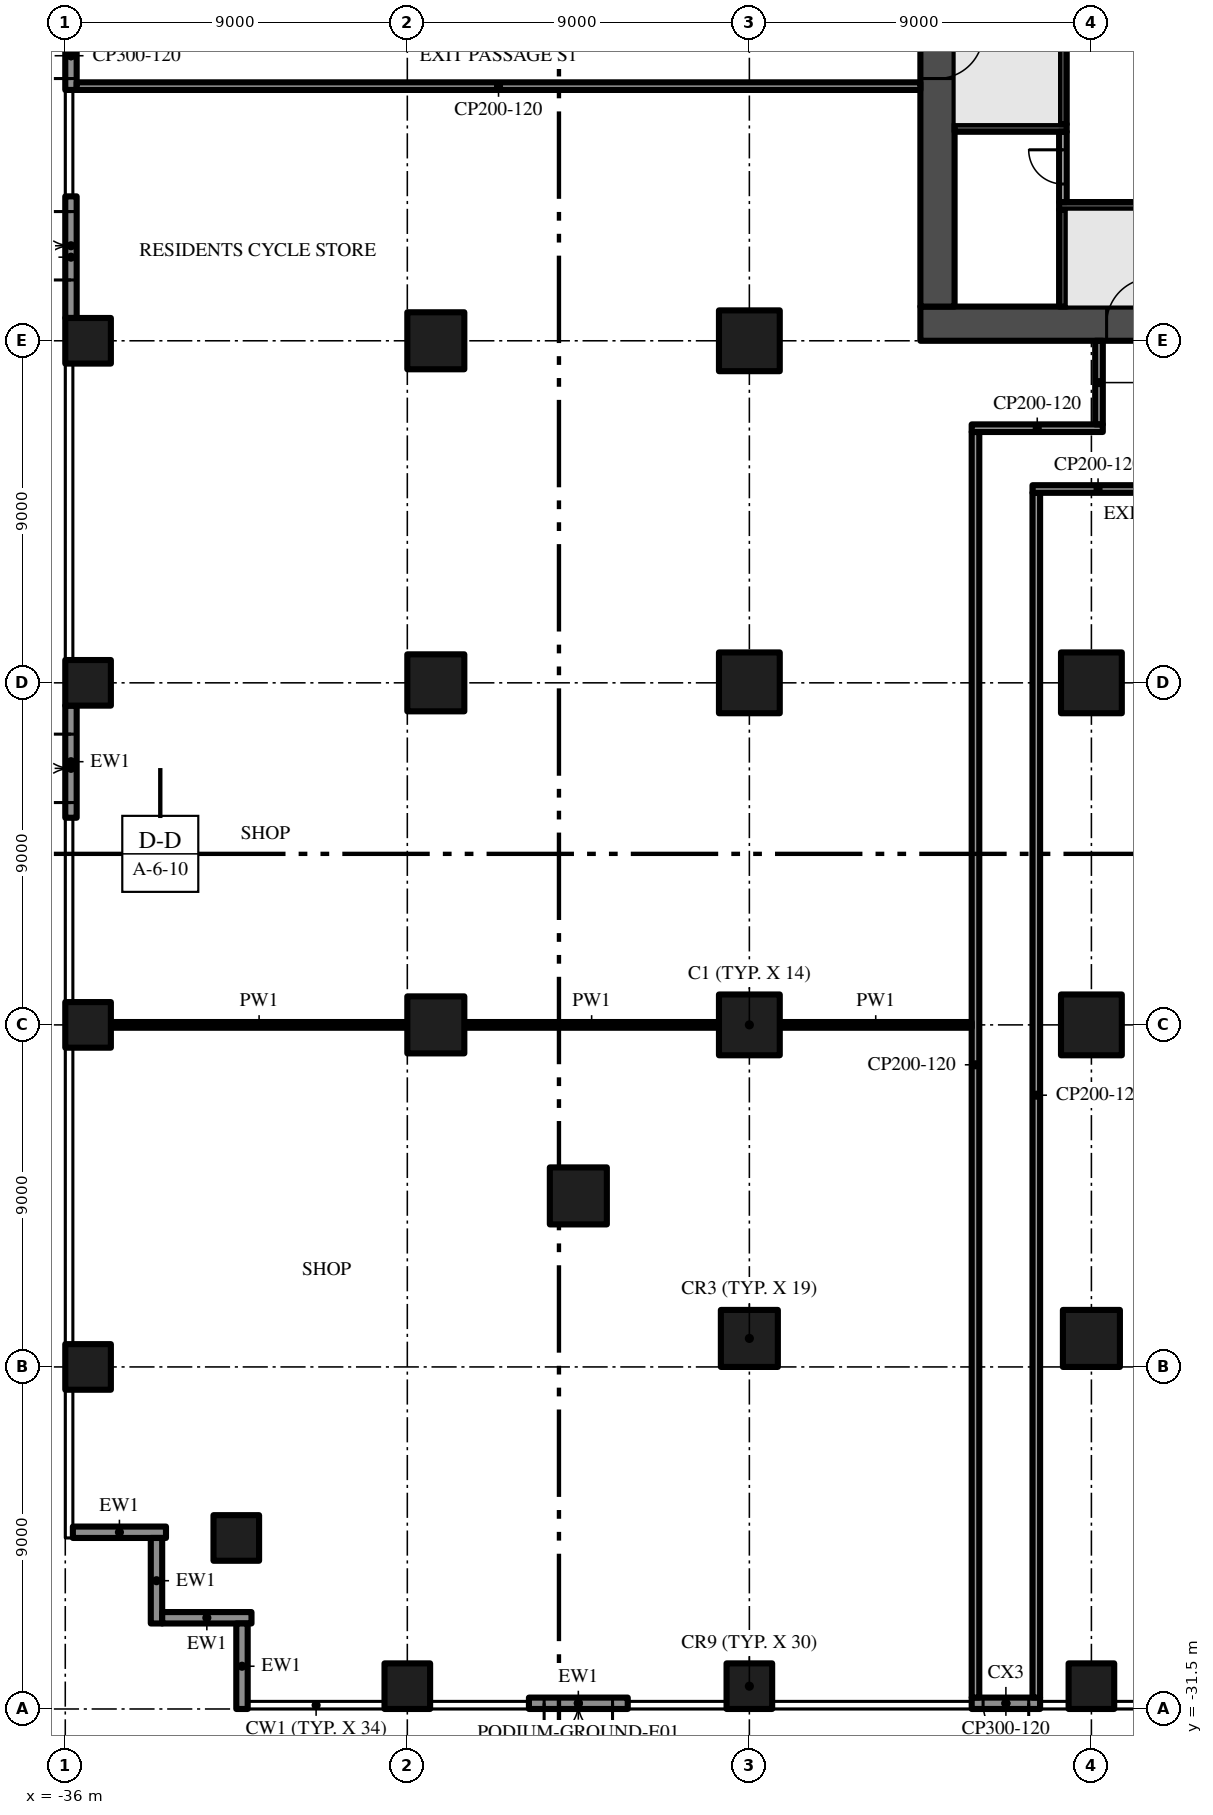
"""IFC4 building model, lengths in metres.
Left out: names, types, materials, properties, quantities, classifications, styles, units other than length and angle.
Written with IfcOpenShell. Run it as: python <this file> out.ifc"""

import sys

from ifc_helpers import new_model, si_unit, direction, frame, frame_2d, origin, origin_2d, place, context, subcontext, project, spatial, rectangle, extrude, element, fill, save


model = new_model("IFC4")
c1 = context("Model", 3, precision=1e-05, world=origin(), true_north=direction((0.0, 1.0)))
c2 = subcontext(c1, "Body", "Model", "MODEL_VIEW")
j1 = project(units=[si_unit("LENGTHUNIT", "METRE"), si_unit("PLANEANGLEUNIT", "RADIAN")], contexts=[c1])
p1 = place(None, origin())
s1 = spatial("IfcSite", under=j1, at=p1, CompositionType="ELEMENT")
p2 = place(p1, origin())
s2 = spatial("IfcBuilding", under=s1, at=p2, CompositionType="ELEMENT")
p3 = place(p2, origin())
s3 = spatial("IfcBuildingStorey", under=s2, at=p3, CompositionType="ELEMENT", Elevation=0.0)
p4 = place(p3, frame((-13.5, 4.95, -2.2), z_axis=(0.0, 0.0, 1.0), x_axis=(1.0, 0.0, 0.0)))
e1 = element("IfcWall", 1, at=p4, inside=s3, PredefinedType="SHEAR", context=c2, shape_type="SweptSolid", body=[
    extrude(rectangle(XDim=27.0, YDim=0.9, at=frame_2d((13.5, 0.0))), origin(), (0.0, 0.0, 1.0), 7.8),
])
p5 = place(p4, frame((12.0, 0.0, 2.2)))
e2 = element("IfcOpeningElement", 2, at=p5, cuts=e1, PredefinedType="OPENING", context=c2, shape_type="SweptSolid", body=[
    extrude(rectangle(XDim=3.0, YDim=2.4, at=frame_2d((1.5, 1.2))), frame((0.0, 0.46, 0.0), z_axis=(0.0, -1.0, 0.0), x_axis=(1.0, 0.0, 0.0)), (0.0, 0.0, 1.0), 0.92),
])
p6 = place(p4, frame((4.9, 0.0, 2.2)))
e3 = element("IfcOpeningElement", 3, at=p6, cuts=e1, PredefinedType="OPENING", context=c2, shape_type="SweptSolid", body=[
    extrude(rectangle(XDim=1.2, YDim=2.2, at=frame_2d((0.6, 1.1))), frame((0.0, 0.46, 0.0), z_axis=(0.0, -1.0, 0.0), x_axis=(1.0, 0.0, 0.0)), (0.0, 0.0, 1.0), 0.92),
])
p7 = place(p4, frame((20.75, 0.0, 2.2)))
e4 = element("IfcOpeningElement", 4, at=p7, cuts=e1, PredefinedType="OPENING", context=c2, shape_type="SweptSolid", body=[
    extrude(rectangle(XDim=1.5, YDim=2.2, at=frame_2d((0.75, 1.1))), frame((0.0, 0.46, 0.0), z_axis=(0.0, -1.0, 0.0), x_axis=(1.0, 0.0, 0.0)), (0.0, 0.0, 1.0), 0.92),
])
p8 = place(p4, frame((17.4, 0.0, 2.2)))
e5 = element("IfcOpeningElement", 5, at=p8, cuts=e1, PredefinedType="OPENING", context=c2, shape_type="SweptSolid", body=[
    extrude(rectangle(XDim=1.2, YDim=2.2, at=frame_2d((0.6, 1.1))), frame((0.0, 0.46, 0.0), z_axis=(0.0, -1.0, 0.0), x_axis=(1.0, 0.0, 0.0)), (0.0, 0.0, 1.0), 0.92),
])
p9 = place(p3, frame((-13.05, 21.6, -2.2), z_axis=(0.0, 0.0, 1.0), x_axis=(0.0, -1.0, 0.0)))
e6 = element("IfcWall", 6, at=p9, inside=s3, PredefinedType="SHEAR", context=c2, shape_type="SweptSolid", body=[
    extrude(rectangle(XDim=16.2, YDim=0.9, at=frame_2d((8.1, 0.0))), origin(), (0.0, 0.0, 1.0), 7.8),
])
p10 = place(p9, frame((9.0, 0.0, 2.2)))
e7 = element("IfcOpeningElement", 7, at=p10, cuts=e6, PredefinedType="OPENING", context=c2, shape_type="SweptSolid", body=[
    extrude(rectangle(XDim=1.2, YDim=2.2, at=frame_2d((0.6, 1.1))), frame((0.0, 0.46, 0.0), z_axis=(0.0, -1.0, 0.0), x_axis=(1.0, 0.0, 0.0)), (0.0, 0.0, 1.0), 0.92),
])
for number, where, z_axis, x_axis in (
    (8, (-18.0, -30.9, 0.0), (0.0, 0.0, 1.0), (1.0, 0.0, 0.0)),
    (9, (-27.0, -30.9, 0.0), (0.0, 0.0, 1.0), (1.0, 0.0, 0.0)),
    (10, (-35.4, -13.5, 0.0), (0.0, 0.0, 1.0), (1.0, 0.0, 0.0)),
    (11, (-35.4, -22.5, 0.0), (0.0, 0.0, 1.0), (1.0, 0.0, 0.0)),
    (12, (-31.5, -27.0, 0.0), (0.0, 0.0, 1.0), (1.0, 0.0, 0.0)),
    (13, (-35.4, -4.5, 0.0), (0.0, 0.0, 1.0), (1.0, 0.0, 0.0)),
    (14, (-35.4, 4.5, 0.0), (0.0, 0.0, 1.0), (1.0, 0.0, 0.0)),
    (15, (-9.0, -30.9, 0.0), (0.0, 0.0, 1.0), (1.0, 0.0, 0.0)),
):
    element("IfcColumn", number, at=place(p3, frame(where, z_axis=z_axis, x_axis=x_axis)), inside=s3, PredefinedType="COLUMN", context=c2, shape_type="SweptSolid", body=[
        extrude(rectangle(XDim=1.2, YDim=1.2, at=origin_2d()), origin(), (0.0, 0.0, 1.0), 5.6),
    ])
p11 = place(p3, frame((-18.0, -13.5, 0.0), z_axis=(0.0, 0.0, 1.0), x_axis=(1.0, 0.0, 0.0)))
e16 = element("IfcColumn", 16, at=p11, inside=s3, PredefinedType="COLUMN", context=c2, shape_type="SweptSolid", body=[
    extrude(rectangle(XDim=1.6, YDim=1.6, at=origin_2d()), origin(), (0.0, 0.0, 1.0), 5.6),
])
p12 = place(p3, frame((-18.0, -21.75, 0.0), z_axis=(0.0, 0.0, 1.0), x_axis=(1.0, 0.0, 0.0)))
e17 = element("IfcColumn", 17, at=p12, inside=s3, PredefinedType="COLUMN", context=c2, shape_type="SweptSolid", body=[
    extrude(rectangle(XDim=1.5, YDim=1.5, at=origin_2d()), origin(), (0.0, 0.0, 1.0), 5.6),
])
for number, where, z_axis, x_axis in (
    (18, (-18.0, -4.5, 0.0), (0.0, 0.0, 1.0), (1.0, 0.0, 0.0)),
    (19, (-18.0, 4.5, 0.0), (0.0, 0.0, 1.0), (1.0, 0.0, 0.0)),
):
    element("IfcColumn", number, at=place(p3, frame(where, z_axis=z_axis, x_axis=x_axis)), inside=s3, PredefinedType="COLUMN", context=c2, shape_type="SweptSolid", body=[
        extrude(rectangle(XDim=1.6, YDim=1.6, at=origin_2d()), origin(), (0.0, 0.0, 1.0), 5.6),
    ])
for number, where, z_axis, x_axis in (
    (20, (-26.25, -13.5, 0.0), (0.0, 0.0, 1.0), (1.0, 0.0, 0.0)),
    (21, (-22.5, -18.0, 0.0), (0.0, 0.0, 1.0), (1.0, 0.0, 0.0)),
    (22, (-26.25, -4.5, 0.0), (0.0, 0.0, 1.0), (1.0, 0.0, 0.0)),
    (23, (-26.25, 4.5, 0.0), (0.0, 0.0, 1.0), (1.0, 0.0, 0.0)),
):
    element("IfcColumn", number, at=place(p3, frame(where, z_axis=z_axis, x_axis=x_axis)), inside=s3, PredefinedType="COLUMN", context=c2, shape_type="SweptSolid", body=[
        extrude(rectangle(XDim=1.5, YDim=1.5, at=origin_2d()), origin(), (0.0, 0.0, 1.0), 5.6),
    ])
p13 = place(p3, frame((-9.0, -13.5, 0.0), z_axis=(0.0, 0.0, 1.0), x_axis=(1.0, 0.0, 0.0)))
e24 = element("IfcColumn", 24, at=p13, inside=s3, PredefinedType="COLUMN", context=c2, shape_type="SweptSolid", body=[
    extrude(rectangle(XDim=1.6, YDim=1.6, at=origin_2d()), origin(), (0.0, 0.0, 1.0), 5.6),
])
p14 = place(p3, frame((-9.0, -21.75, 0.0), z_axis=(0.0, 0.0, 1.0), x_axis=(1.0, 0.0, 0.0)))
e25 = element("IfcColumn", 25, at=p14, inside=s3, PredefinedType="COLUMN", context=c2, shape_type="SweptSolid", body=[
    extrude(rectangle(XDim=1.5, YDim=1.5, at=origin_2d()), origin(), (0.0, 0.0, 1.0), 5.6),
])
p15 = place(p3, frame((-9.0, -4.5, 0.0), z_axis=(0.0, 0.0, 1.0), x_axis=(1.0, 0.0, 0.0)))
e26 = element("IfcColumn", 26, at=p15, inside=s3, PredefinedType="COLUMN", context=c2, shape_type="SweptSolid", body=[
    extrude(rectangle(XDim=1.6, YDim=1.6, at=origin_2d()), origin(), (0.0, 0.0, 1.0), 5.6),
])
p16 = place(p3, frame((-21.2, -31.35, 0.0), z_axis=(0.0, 0.0, 1.0), x_axis=(-1.0, 0.0, 0.0)))
e27 = element("IfcWall", 27, at=p16, inside=s3, PredefinedType="SOLIDWALL", context=c2, shape_type="SweptSolid", body=[
    extrude(rectangle(XDim=2.6, YDim=0.3, at=frame_2d((1.3, 0.0))), origin(), (0.0, 0.0, 1.0), 5.6),
])
p17 = place(p16, frame((0.4, 0.0, 0.0)))
e28 = element("IfcOpeningElement", 28, at=p17, cuts=e27, PredefinedType="OPENING", context=c2, shape_type="SweptSolid", body=[
    extrude(rectangle(XDim=1.8, YDim=2.7, at=frame_2d((0.9, 1.35))), frame((0.0, 0.16, 0.0), z_axis=(0.0, -1.0, 0.0), x_axis=(1.0, 0.0, 0.0)), (0.0, 0.0, 1.0), 0.32),
])
p18 = place(p3, frame((-35.85, -8.05, 0.0), z_axis=(0.0, 0.0, 1.0), x_axis=(0.0, 1.0, 0.0)))
e29 = element("IfcWall", 29, at=p18, inside=s3, PredefinedType="SOLIDWALL", context=c2, shape_type="SweptSolid", body=[
    extrude(rectangle(XDim=2.95, YDim=0.3, at=frame_2d((1.475, 0.0))), origin(), (0.0, 0.0, 1.0), 5.6),
])
p19 = place(p18, frame((0.4, 0.0, 0.0)))
e30 = element("IfcOpeningElement", 30, at=p19, cuts=e29, PredefinedType="OPENING", context=c2, shape_type="SweptSolid", body=[
    extrude(rectangle(XDim=1.8, YDim=2.7, at=frame_2d((0.9, 1.35))), frame((0.0, 0.16, 0.0), z_axis=(0.0, -1.0, 0.0), x_axis=(1.0, 0.0, 0.0)), (0.0, 0.0, 1.0), 0.32),
])
p20 = place(p3, frame((-35.85, 5.1, 0.0), z_axis=(0.0, 0.0, 1.0), x_axis=(0.0, 1.0, 0.0)))
e31 = element("IfcWall", 31, at=p20, inside=s3, PredefinedType="SOLIDWALL", context=c2, shape_type="SweptSolid", body=[
    extrude(rectangle(XDim=3.2, YDim=0.3, at=frame_2d((1.6, 0.0))), origin(), (0.0, 0.0, 1.0), 5.6),
])
p21 = place(p20, frame((1.0, 0.0, 0.0)))
e32 = element("IfcOpeningElement", 32, at=p21, cuts=e31, PredefinedType="OPENING", context=c2, shape_type="SweptSolid", body=[
    extrude(rectangle(XDim=1.8, YDim=2.4, at=frame_2d((0.9, 1.2))), frame((0.0, 0.16, 0.0), z_axis=(0.0, -1.0, 0.0), x_axis=(1.0, 0.0, 0.0)), (0.0, 0.0, 1.0), 0.32),
])
p22 = place(p3, frame((-33.35, -26.85, 0.0), z_axis=(0.0, 0.0, 1.0), x_axis=(-1.0, 0.0, 0.0)))
e33 = element("IfcWall", 33, at=p22, inside=s3, PredefinedType="SOLIDWALL", context=c2, shape_type="SweptSolid", body=[
    extrude(rectangle(XDim=2.45, YDim=0.3, at=frame_2d((1.225, 0.0))), origin(), (0.0, 0.0, 1.0), 5.6),
])
p23 = place(p3, frame((-33.6, -29.25, 0.0), z_axis=(0.0, 0.0, 1.0), x_axis=(0.0, 1.0, 0.0)))
e34 = element("IfcWall", 34, at=p23, inside=s3, PredefinedType="SOLIDWALL", context=c2, shape_type="SweptSolid", body=[
    extrude(rectangle(XDim=2.25, YDim=0.3, at=frame_2d((1.125, 0.0))), origin(), (0.0, 0.0, 1.0), 5.6),
])
p24 = place(p3, frame((-31.1, -29.1, 0.0), z_axis=(0.0, 0.0, 1.0), x_axis=(-1.0, 0.0, 0.0)))
e35 = element("IfcWall", 35, at=p24, inside=s3, PredefinedType="SOLIDWALL", context=c2, shape_type="SweptSolid", body=[
    extrude(rectangle(XDim=2.35, YDim=0.3, at=frame_2d((1.175, 0.0))), origin(), (0.0, 0.0, 1.0), 5.6),
])
p25 = place(p3, frame((-31.35, -31.5, 0.0), z_axis=(0.0, 0.0, 1.0), x_axis=(0.0, 1.0, 0.0)))
e36 = element("IfcWall", 36, at=p25, inside=s3, PredefinedType="SOLIDWALL", context=c2, shape_type="SweptSolid", body=[
    extrude(rectangle(XDim=2.25, YDim=0.3, at=frame_2d((1.125, 0.0))), origin(), (0.0, 0.0, 1.0), 5.6),
])
p26 = place(p3, frame((-12.6, 10.1, -0.4), z_axis=(0.0, 0.0, 1.0), x_axis=(1.0, 0.0, 0.0)))
e37 = element("IfcWall", 37, at=p26, inside=s3, PredefinedType="SHEAR", context=c2, shape_type="SweptSolid", body=[
    extrude(rectangle(XDim=2.95, YDim=0.2, at=frame_2d((1.475, 0.0))), origin(), (0.0, 0.0, 1.0), 6.0),
])
p27 = place(p3, frame((-9.75, 5.4, -0.4), z_axis=(0.0, 0.0, 1.0), x_axis=(0.0, 1.0, 0.0)))
e38 = element("IfcWall", 38, at=p27, inside=s3, PredefinedType="SHEAR", context=c2, shape_type="SweptSolid", body=[
    extrude(rectangle(XDim=2.55, YDim=0.2, at=frame_2d((1.275, 0.0))), origin(), (0.0, 0.0, 1.0), 6.0),
])
p28 = place(p3, frame((-9.85, 8.05, -0.4), z_axis=(0.0, 0.0, 1.0), x_axis=(1.0, 0.0, 0.0)))
e39 = element("IfcWall", 39, at=p28, inside=s3, PredefinedType="SHEAR", context=c2, shape_type="SweptSolid", body=[
    extrude(rectangle(XDim=8.35, YDim=0.2, at=frame_2d((4.175, 0.0))), origin(), (0.0, 0.0, 1.0), 6.0),
])
p29 = place(p3, frame((-9.75, 8.15, 0.0), z_axis=(0.0, 0.0, 1.0), x_axis=(0.0, 1.0, 0.0)))
e40 = element("IfcWall", 40, at=p29, inside=s3, PredefinedType="PARTITIONING", context=c2, shape_type="SweptSolid", body=[
    extrude(rectangle(XDim=1.85, YDim=0.2, at=frame_2d((0.925, 0.0))), origin(), (0.0, 0.0, 1.0), 5.6),
])
p30 = place(p29, frame((0.475, 0.0, 0.0)))
e41 = element("IfcOpeningElement", 41, at=p30, cuts=e40, PredefinedType="OPENING", context=c2, shape_type="SweptSolid", body=[
    extrude(rectangle(XDim=0.9, YDim=2.1, at=frame_2d((0.45, 1.05))), frame((0.0, 0.11, 0.0), z_axis=(0.0, -1.0, 0.0), x_axis=(1.0, 0.0, 0.0)), (0.0, 0.0, 1.0), 0.22),
])
p31 = place(p3, frame((-9.75, 10.2, -0.4), z_axis=(0.0, 0.0, 1.0), x_axis=(0.0, 1.0, 0.0)))
e42 = element("IfcWall", 42, at=p31, inside=s3, PredefinedType="SHEAR", context=c2, shape_type="SweptSolid", body=[
    extrude(rectangle(XDim=5.7, YDim=0.2, at=frame_2d((2.85, 0.0))), origin(), (0.0, 0.0, 1.0), 6.0),
])
p32 = place(p3, frame((-35.7, 11.2, 0.0), z_axis=(0.0, 0.0, 1.0), x_axis=(1.0, 0.0, 0.0)))
e43 = element("IfcWall", 43, at=p32, inside=s3, PredefinedType="PARTITIONING", context=c2, shape_type="SweptSolid", body=[
    extrude(rectangle(XDim=22.2, YDim=0.2, at=frame_2d((11.1, 0.0))), origin(), (0.0, 0.0, 1.0), 5.6),
])
p33 = place(p3, frame((-35.85, 11.1, 0.0), z_axis=(0.0, 0.0, 1.0), x_axis=(0.0, 1.0, 0.0)))
e44 = element("IfcWall", 44, at=p33, inside=s3, PredefinedType="PARTITIONING", context=c2, shape_type="SweptSolid", body=[
    extrude(rectangle(XDim=1.8, YDim=0.3, at=frame_2d((0.9, 0.0))), origin(), (0.0, 0.0, 1.0), 5.6),
])
p34 = place(p33, frame((0.3, 0.0, 0.0)))
e45 = element("IfcOpeningElement", 45, at=p34, cuts=e44, PredefinedType="OPENING", context=c2, shape_type="SweptSolid", body=[
    extrude(rectangle(XDim=1.2, YDim=2.2, at=frame_2d((0.6, 1.1))), frame((0.0, 0.16, 0.0), z_axis=(0.0, -1.0, 0.0), x_axis=(1.0, 0.0, 0.0)), (0.0, 0.0, 1.0), 0.32),
])
p35 = place(p3, frame((-12.05, -31.2, 0.0), z_axis=(0.0, 0.0, 1.0), x_axis=(0.0, 1.0, 0.0)))
e46 = element("IfcWall", 46, at=p35, inside=s3, PredefinedType="PARTITIONING", context=c2, shape_type="SweptSolid", body=[
    extrude(rectangle(XDim=33.3, YDim=0.2, at=frame_2d((16.65, 0.0))), origin(), (0.0, 0.0, 1.0), 5.6),
])
p36 = place(p3, frame((-12.15, 2.2, 0.0), z_axis=(0.0, 0.0, 1.0), x_axis=(1.0, 0.0, 0.0)))
e47 = element("IfcWall", 47, at=p36, inside=s3, PredefinedType="PARTITIONING", context=c2, shape_type="SweptSolid", body=[
    extrude(rectangle(XDim=3.45, YDim=0.2, at=frame_2d((1.725, 0.0))), origin(), (0.0, 0.0, 1.0), 5.6),
])
p37 = place(p3, frame((-10.45, -31.2, 0.0), z_axis=(0.0, 0.0, 1.0), x_axis=(0.0, 1.0, 0.0)))
e48 = element("IfcWall", 48, at=p37, inside=s3, PredefinedType="PARTITIONING", context=c2, shape_type="SweptSolid", body=[
    extrude(rectangle(XDim=31.7, YDim=0.2, at=frame_2d((15.85, 0.0))), origin(), (0.0, 0.0, 1.0), 5.6),
])
p38 = place(p3, frame((-10.55, 0.6, 0.0), z_axis=(0.0, 0.0, 1.0), x_axis=(1.0, 0.0, 0.0)))
e49 = element("IfcWall", 49, at=p38, inside=s3, PredefinedType="PARTITIONING", context=c2, shape_type="SweptSolid", body=[
    extrude(rectangle(XDim=3.45, YDim=0.2, at=frame_2d((1.725, 0.0))), origin(), (0.0, 0.0, 1.0), 5.6),
])
p39 = place(p3, frame((-8.8, 2.3, 0.0), z_axis=(0.0, 0.0, 1.0), x_axis=(0.0, 1.0, 0.0)))
e50 = element("IfcWall", 50, at=p39, inside=s3, PredefinedType="PARTITIONING", context=c2, shape_type="SweptSolid", body=[
    extrude(rectangle(XDim=2.2, YDim=0.2, at=frame_2d((1.1, 0.0))), origin(), (0.0, 0.0, 1.0), 5.6),
])
p40 = place(p3, frame((-10.35, -31.35, 0.0), z_axis=(0.0, 0.0, 1.0), x_axis=(-1.0, 0.0, 0.0)))
e51 = element("IfcWall", 51, at=p40, inside=s3, PredefinedType="PARTITIONING", context=c2, shape_type="SweptSolid", body=[
    extrude(rectangle(XDim=1.8, YDim=0.3, at=frame_2d((0.9, 0.0))), origin(), (0.0, 0.0, 1.0), 5.6),
])
p41 = place(p40, frame((0.3, 0.0, 0.0)))
e52 = element("IfcOpeningElement", 52, at=p41, cuts=e51, PredefinedType="OPENING", context=c2, shape_type="SweptSolid", body=[
    extrude(rectangle(XDim=1.2, YDim=2.2, at=frame_2d((0.6, 1.1))), frame((0.0, 0.16, 0.0), z_axis=(0.0, -1.0, 0.0), x_axis=(1.0, 0.0, 0.0)), (0.0, 0.0, 1.0), 0.32),
])
p42 = place(p3, frame((-34.8, -13.5, 0.0), z_axis=(0.0, 0.0, 1.0), x_axis=(1.0, 0.0, 0.0)))
e53 = element("IfcWall", 53, at=p42, inside=s3, PredefinedType="PARTITIONING", context=c2, shape_type="SweptSolid", body=[
    extrude(rectangle(XDim=7.8, YDim=0.15, at=frame_2d((3.9, 0.0))), origin(), (0.0, 0.0, 1.0), 5.6),
])
p43 = place(p3, frame((-25.5, -13.5, 0.0), z_axis=(0.0, 0.0, 1.0), x_axis=(1.0, 0.0, 0.0)))
e54 = element("IfcWall", 54, at=p43, inside=s3, PredefinedType="PARTITIONING", context=c2, shape_type="SweptSolid", body=[
    extrude(rectangle(XDim=6.7, YDim=0.15, at=frame_2d((3.35, 0.0))), origin(), (0.0, 0.0, 1.0), 5.6),
])
p44 = place(p3, frame((-17.2, -13.5, 0.0), z_axis=(0.0, 0.0, 1.0), x_axis=(1.0, 0.0, 0.0)))
e55 = element("IfcWall", 55, at=p44, inside=s3, PredefinedType="PARTITIONING", context=c2, shape_type="SweptSolid", body=[
    extrude(rectangle(XDim=5.05, YDim=0.15, at=frame_2d((2.525, 0.0))), origin(), (0.0, 0.0, 1.0), 5.6),
])
p45 = place(p17, origin())
e56 = element("IfcDoor", 56, at=p45, inside=s3, OperationType="SINGLE_SWING_LEFT", PredefinedType="DOOR", context=c2, shape_type="SweptSolid", body=[
    extrude(rectangle(XDim=1.8, YDim=2.7, at=frame_2d((0.9, 1.35))), frame((0.0, 0.025, 0.0), z_axis=(0.0, -1.0, 0.0), x_axis=(1.0, 0.0, 0.0)), (0.0, 0.0, 1.0), 0.05),
])
fill(e28, e56)
p46 = place(p19, origin())
e57 = element("IfcDoor", 57, at=p46, inside=s3, OperationType="SINGLE_SWING_LEFT", PredefinedType="DOOR", context=c2, shape_type="SweptSolid", body=[
    extrude(rectangle(XDim=1.8, YDim=2.7, at=frame_2d((0.9, 1.35))), frame((0.0, 0.025, 0.0), z_axis=(0.0, -1.0, 0.0), x_axis=(1.0, 0.0, 0.0)), (0.0, 0.0, 1.0), 0.05),
])
fill(e30, e57)
p47 = place(p21, origin())
e58 = element("IfcDoor", 58, at=p47, inside=s3, OperationType="SINGLE_SWING_LEFT", PredefinedType="DOOR", context=c2, shape_type="SweptSolid", body=[
    extrude(rectangle(XDim=1.8, YDim=2.4, at=frame_2d((0.9, 1.2))), frame((0.0, 0.025, 0.0), z_axis=(0.0, -1.0, 0.0), x_axis=(1.0, 0.0, 0.0)), (0.0, 0.0, 1.0), 0.05),
])
fill(e32, e58)
p48 = place(p10, frame((1.2, 0.0, 0.0), z_axis=(0.0, 0.0, 1.0), x_axis=(-1.0, 0.0, 0.0)))
e59 = element("IfcDoor", 59, at=p48, inside=s3, OperationType="SINGLE_SWING_RIGHT", PredefinedType="DOOR", context=c2, shape_type="SweptSolid", body=[
    extrude(rectangle(XDim=1.2, YDim=2.2, at=frame_2d((0.6, 1.1))), frame((0.0, 0.025, 0.0), z_axis=(0.0, -1.0, 0.0), x_axis=(1.0, 0.0, 0.0)), (0.0, 0.0, 1.0), 0.05),
])
fill(e7, e59)
p49 = place(p6, frame((1.2, 0.0, 0.0), z_axis=(0.0, 0.0, 1.0), x_axis=(-1.0, 0.0, 0.0)))
e60 = element("IfcDoor", 60, at=p49, inside=s3, OperationType="SINGLE_SWING_LEFT", PredefinedType="DOOR", context=c2, shape_type="SweptSolid", body=[
    extrude(rectangle(XDim=1.2, YDim=2.2, at=frame_2d((0.6, 1.1))), frame((0.0, 0.025, 0.0), z_axis=(0.0, -1.0, 0.0), x_axis=(1.0, 0.0, 0.0)), (0.0, 0.0, 1.0), 0.05),
])
fill(e3, e60)
p50 = place(p30, origin())
e61 = element("IfcDoor", 61, at=p50, inside=s3, OperationType="SINGLE_SWING_RIGHT", PredefinedType="DOOR", context=c2, shape_type="SweptSolid", body=[
    extrude(rectangle(XDim=0.9, YDim=2.1, at=frame_2d((0.45, 1.05))), frame((0.0, 0.025, 0.0), z_axis=(0.0, -1.0, 0.0), x_axis=(1.0, 0.0, 0.0)), (0.0, 0.0, 1.0), 0.05),
])
fill(e41, e61)
p51 = place(p34, origin())
e62 = element("IfcDoor", 62, at=p51, inside=s3, OperationType="SINGLE_SWING_LEFT", PredefinedType="DOOR", context=c2, shape_type="SweptSolid", body=[
    extrude(rectangle(XDim=1.2, YDim=2.2, at=frame_2d((0.6, 1.1))), frame((0.0, 0.025, 0.0), z_axis=(0.0, -1.0, 0.0), x_axis=(1.0, 0.0, 0.0)), (0.0, 0.0, 1.0), 0.05),
])
fill(e45, e62)
p52 = place(p41, origin())
e63 = element("IfcDoor", 63, at=p52, inside=s3, OperationType="SINGLE_SWING_LEFT", PredefinedType="DOOR", context=c2, shape_type="SweptSolid", body=[
    extrude(rectangle(XDim=1.2, YDim=2.2, at=frame_2d((0.6, 1.1))), frame((0.0, 0.025, 0.0), z_axis=(0.0, -1.0, 0.0), x_axis=(1.0, 0.0, 0.0)), (0.0, 0.0, 1.0), 0.05),
])
fill(e52, e63)
save(model, sys.argv[1])
